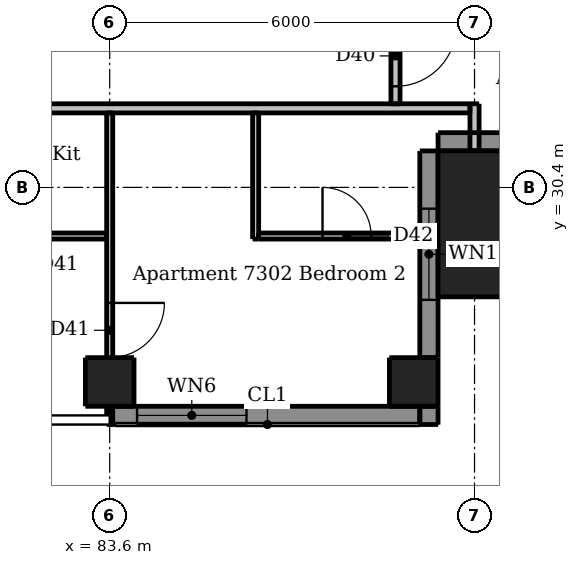
"""IFC4 building model, lengths in metres.
Left out: names, types, materials, properties, quantities, classifications, styles, units other than length and angle.
Written with IfcOpenShell. Run it as: python <this file> out.ifc"""

import sys

from ifc_helpers import new_model, si_unit, direction, frame, frame_2d, origin, origin_2d, place, context, subcontext, project, spatial, rectangle, extrude, element, fill, save


model = new_model("IFC4")
c1 = context("Model", 3, precision=1e-05, world=origin(), true_north=direction((0.0, 1.0)))
c2 = subcontext(c1, "Body", "Model", "MODEL_VIEW")
j1 = project(units=[si_unit("LENGTHUNIT", "METRE"), si_unit("PLANEANGLEUNIT", "RADIAN")], contexts=[c1])
p1 = place(None, origin())
s1 = spatial("IfcSite", under=j1, at=p1, CompositionType="ELEMENT")
p2 = place(p1, origin())
s2 = spatial("IfcBuilding", under=s1, at=p2, CompositionType="ELEMENT")
p3 = place(p2, frame((0.0, 0.0, 271.9)))
s3 = spatial("IfcBuildingStorey", under=s2, at=p3, CompositionType="ELEMENT", Elevation=271.9)
for number, where, z_axis, x_axis in (
    (1, (83.6, 27.2, 0.0), (0.0, 0.0, 1.0), (1.0, 0.0, 0.0)),
    (2, (88.6, 27.2, 0.0), (0.0, 0.0, 1.0), (1.0, 0.0, 0.0)),
):
    element("IfcColumn", number, at=place(p3, frame(where, z_axis=z_axis, x_axis=x_axis)), inside=s3, PredefinedType="COLUMN", context=c2, shape_type="SweptSolid", body=[
        extrude(rectangle(XDim=0.8, YDim=0.8, at=origin_2d()), origin(), (0.0, 0.0, 1.0), 3.05),
    ])
p4 = place(p3, frame((90.2, 29.8, 0.0), z_axis=(0.0, 0.0, 1.0), x_axis=(1.0, 0.0, 0.0)))
e3 = element("IfcColumn", 3, at=p4, inside=s3, PredefinedType="COLUMN", context=c2, shape_type="SweptSolid", body=[
    extrude(rectangle(XDim=2.4, YDim=2.4, at=origin_2d()), origin(), (0.0, 0.0, 1.0), 3.3),
])
p5 = place(p3, frame((88.85, 26.5, 0.0), z_axis=(0.0, 0.0, 1.0), x_axis=(0.0, 1.0, 0.0)))
e4 = element("IfcWall", 4, at=p5, inside=s3, PredefinedType="SOLIDWALL", context=c2, shape_type="SweptSolid", body=[
    extrude(rectangle(XDim=0.3, YDim=0.3, at=frame_2d((0.15, 0.0))), origin(), (0.0, 0.0, 1.0), 3.05),
])
p6 = place(p3, frame((88.85, 27.6, 0.0), z_axis=(0.0, 0.0, 1.0), x_axis=(0.0, 1.0, 0.0)))
e5 = element("IfcWall", 5, at=p6, inside=s3, PredefinedType="SOLIDWALL", context=c2, shape_type="SweptSolid", body=[
    extrude(rectangle(XDim=3.4, YDim=0.3, at=frame_2d((1.7, 0.0))), origin(), (0.0, 0.0, 1.0), 3.05),
])
p7 = place(p6, frame((0.95, 0.0, 0.9)))
e6 = element("IfcOpeningElement", 6, at=p7, cuts=e5, PredefinedType="OPENING", context=c2, shape_type="SweptSolid", body=[
    extrude(rectangle(XDim=1.5, YDim=1.5, at=frame_2d((0.75, 0.75))), frame((0.0, 0.16, 0.0), z_axis=(0.0, -1.0, 0.0), x_axis=(1.0, 0.0, 0.0)), (0.0, 0.0, 1.0), 0.32),
])
p8 = place(p3, frame((89.0, 31.15, 0.0), z_axis=(0.0, 0.0, 1.0), x_axis=(1.0, 0.0, 0.0)))
e7 = element("IfcWall", 7, at=p8, inside=s3, PredefinedType="SOLIDWALL", context=c2, shape_type="SweptSolid", body=[
    extrude(rectangle(XDim=3.4, YDim=0.3, at=frame_2d((1.7, 0.0))), origin(), (0.0, 0.0, 1.0), 3.05),
])
p9 = place(p3, frame((83.6, 26.65, 0.0), z_axis=(0.0, 0.0, 1.0), x_axis=(1.0, 0.0, 0.0)))
e8 = element("IfcWall", 8, at=p9, inside=s3, PredefinedType="SOLIDWALL", context=c2, shape_type="SweptSolid", body=[
    extrude(rectangle(XDim=5.1, YDim=0.3, at=frame_2d((2.55, 0.0))), origin(), (0.0, 0.0, 1.0), 3.05),
])
p10 = place(p9, frame((0.45, 0.0, 0.15)))
e9 = element("IfcOpeningElement", 9, at=p10, cuts=e8, PredefinedType="OPENING", context=c2, shape_type="SweptSolid", body=[
    extrude(rectangle(XDim=1.8, YDim=2.1, at=frame_2d((0.9, 1.05))), frame((0.0, 0.16, 0.0), z_axis=(0.0, -1.0, 0.0), x_axis=(1.0, 0.0, 0.0)), (0.0, 0.0, 1.0), 0.32),
])
p11 = place(p3, frame((83.6, 31.625, 0.0), z_axis=(0.0, 0.0, 1.0), x_axis=(0.0, -1.0, 0.0)))
e10 = element("IfcWall", 10, at=p11, inside=s3, PredefinedType="PARTITIONING", context=c2, shape_type="SweptSolid", body=[
    extrude(rectangle(XDim=5.125, YDim=0.1, at=frame_2d((2.562, 0.0))), origin(), (0.0, 0.0, 1.0), 2.647),
])
p12 = place(p11, frame((3.125, 0.0, 0.0)))
e11 = element("IfcOpeningElement", 11, at=p12, cuts=e10, PredefinedType="OPENING", context=c2, shape_type="SweptSolid", body=[
    extrude(rectangle(XDim=0.9, YDim=2.1, at=frame_2d((0.45, 1.05))), frame((0.0, 0.06, 0.0), z_axis=(0.0, -1.0, 0.0), x_axis=(1.0, 0.0, 0.0)), (0.0, 0.0, 1.0), 0.12),
])
p13 = place(p3, frame((86.0, 29.55, 0.0), z_axis=(0.0, 0.0, 1.0), x_axis=(0.0, 1.0, 0.0)))
e12 = element("IfcWall", 12, at=p13, inside=s3, PredefinedType="PARTITIONING", context=c2, shape_type="SweptSolid", body=[
    extrude(rectangle(XDim=2.075, YDim=0.1, at=frame_2d((1.038, 0.0))), origin(), (0.0, 0.0, 1.0), 3.05),
])
p14 = place(p3, frame((80.65, 29.6, 0.0), z_axis=(0.0, 0.0, 1.0), x_axis=(1.0, 0.0, 0.0)))
e13 = element("IfcWall", 13, at=p14, inside=s3, PredefinedType="PARTITIONING", context=c2, shape_type="SweptSolid", body=[
    extrude(rectangle(XDim=2.9, YDim=0.1, at=frame_2d((1.45, 0.0))), origin(), (0.0, 0.0, 1.0), 3.05),
])
p15 = place(p14, frame((1.0, 0.0, 0.0)))
e14 = element("IfcOpeningElement", 14, at=p15, cuts=e13, PredefinedType="OPENING", context=c2, shape_type="SweptSolid", body=[
    extrude(rectangle(XDim=0.9, YDim=2.1, at=frame_2d((0.45, 1.05))), frame((0.0, 0.06, 0.0), z_axis=(0.0, -1.0, 0.0), x_axis=(1.0, 0.0, 0.0)), (0.0, 0.0, 1.0), 0.12),
])
p16 = place(p3, frame((86.05, 29.6, 0.0), z_axis=(0.0, 0.0, 1.0), x_axis=(1.0, 0.0, 0.0)))
e15 = element("IfcWall", 15, at=p16, inside=s3, PredefinedType="PARTITIONING", context=c2, shape_type="SweptSolid", body=[
    extrude(rectangle(XDim=2.75, YDim=0.1, at=frame_2d((1.375, 0.0))), origin(), (0.0, 0.0, 1.0), 3.05),
])
p17 = place(p16, frame((1.05, 0.0, 0.0)))
e16 = element("IfcOpeningElement", 16, at=p17, cuts=e15, PredefinedType="OPENING", context=c2, shape_type="SweptSolid", body=[
    extrude(rectangle(XDim=0.8, YDim=2.1, at=frame_2d((0.4, 1.05))), frame((0.0, 0.06, 0.0), z_axis=(0.0, -1.0, 0.0), x_axis=(1.0, 0.0, 0.0)), (0.0, 0.0, 1.0), 0.12),
])
p18 = place(p3, frame((88.3, 61.175, 0.0), z_axis=(0.0, 0.0, 1.0), x_axis=(0.0, -1.0, 0.0)))
e17 = element("IfcWall", 17, at=p18, inside=s3, PredefinedType="PARTITIONING", context=c2, shape_type="SweptSolid", body=[
    extrude(rectangle(XDim=29.4, YDim=0.15, at=frame_2d((14.7, 0.0))), origin(), (0.0, 0.0, 1.0), 3.05),
])
p19 = place(p18, frame((28.113, 0.0, 0.0)))
e18 = element("IfcOpeningElement", 18, at=p19, cuts=e17, PredefinedType="OPENING", context=c2, shape_type="SweptSolid", body=[
    extrude(rectangle(XDim=1.0, YDim=2.1, at=frame_2d((0.5, 1.05))), frame((0.0, 0.085, 0.0), z_axis=(0.0, -1.0, 0.0), x_axis=(1.0, 0.0, 0.0)), (0.0, 0.0, 1.0), 0.17),
])
p20 = place(p18, frame((10.775, 0.0, 0.0)))
e19 = element("IfcOpeningElement", 19, at=p20, cuts=e17, PredefinedType="OPENING", context=c2, shape_type="SweptSolid", body=[
    extrude(rectangle(XDim=1.0, YDim=2.1, at=frame_2d((0.5, 1.05))), frame((0.0, 0.085, 0.0), z_axis=(0.0, -1.0, 0.0), x_axis=(1.0, 0.0, 0.0)), (0.0, 0.0, 1.0), 0.17),
])
p21 = place(p3, frame((89.6, 31.0, 0.0), z_axis=(0.0, 0.0, 1.0), x_axis=(0.0, 1.0, 0.0)))
e20 = element("IfcWall", 20, at=p21, inside=s3, PredefinedType="PARTITIONING", context=c2, shape_type="SweptSolid", body=[
    extrude(rectangle(XDim=0.775, YDim=0.15, at=frame_2d((0.387, 0.0))), origin(), (0.0, 0.0, 1.0), 3.05),
])
p22 = place(p3, frame((89.525, 31.7, 0.0), z_axis=(0.0, 0.0, 1.0), x_axis=(-1.0, 0.0, 0.0)))
e21 = element("IfcWall", 21, at=p22, inside=s3, PredefinedType="PARTITIONING", context=c2, shape_type="SweptSolid", body=[
    extrude(rectangle(XDim=30.55, YDim=0.15, at=frame_2d((15.275, 0.0))), origin(), (0.0, 0.0, 1.0), 3.05),
])
p23 = place(p22, frame((28.275, 0.0, 0.0)))
e22 = element("IfcOpeningElement", 22, at=p23, cuts=e21, PredefinedType="OPENING", context=c2, shape_type="SweptSolid", body=[
    extrude(rectangle(XDim=1.0, YDim=2.1, at=frame_2d((0.5, 1.05))), frame((0.0, 0.085, 0.0), z_axis=(0.0, -1.0, 0.0), x_axis=(1.0, 0.0, 0.0)), (0.0, 0.0, 1.0), 0.17),
])
p24 = place(p22, frame((11.425, 0.0, 0.0)))
e23 = element("IfcOpeningElement", 23, at=p24, cuts=e21, PredefinedType="OPENING", context=c2, shape_type="SweptSolid", body=[
    extrude(rectangle(XDim=1.0, YDim=2.1, at=frame_2d((0.5, 1.05))), frame((0.0, 0.085, 0.0), z_axis=(0.0, -1.0, 0.0), x_axis=(1.0, 0.0, 0.0)), (0.0, 0.0, 1.0), 0.17),
])
p25 = place(p7, origin())
e24 = element("IfcWindow", 24, at=p25, inside=s3, PartitioningType="DOUBLE_PANEL_VERTICAL", PredefinedType="WINDOW", context=c2, shape_type="SweptSolid", body=[
    extrude(rectangle(XDim=1.5, YDim=1.5, at=frame_2d((0.75, 0.75))), frame((0.0, 0.03, 0.0), z_axis=(0.0, -1.0, 0.0), x_axis=(1.0, 0.0, 0.0)), (0.0, 0.0, 1.0), 0.06),
])
fill(e6, e24)
p26 = place(p10, origin())
e25 = element("IfcWindow", 25, at=p26, inside=s3, PartitioningType="DOUBLE_PANEL_VERTICAL", PredefinedType="WINDOW", context=c2, shape_type="SweptSolid", body=[
    extrude(rectangle(XDim=1.8, YDim=2.1, at=frame_2d((0.9, 1.05))), frame((0.0, 0.03, 0.0), z_axis=(0.0, -1.0, 0.0), x_axis=(1.0, 0.0, 0.0)), (0.0, 0.0, 1.0), 0.06),
])
fill(e9, e25)
p27 = place(p12, origin())
e26 = element("IfcDoor", 26, at=p27, inside=s3, OperationType="SINGLE_SWING_LEFT", PredefinedType="DOOR", context=c2, shape_type="SweptSolid", body=[
    extrude(rectangle(XDim=0.9, YDim=2.1, at=frame_2d((0.45, 1.05))), frame((0.0, 0.025, 0.0), z_axis=(0.0, -1.0, 0.0), x_axis=(1.0, 0.0, 0.0)), (0.0, 0.0, 1.0), 0.05),
])
fill(e11, e26)
p28 = place(p17, origin())
e27 = element("IfcDoor", 27, at=p28, inside=s3, OperationType="SINGLE_SWING_LEFT", PredefinedType="DOOR", context=c2, shape_type="SweptSolid", body=[
    extrude(rectangle(XDim=0.8, YDim=2.1, at=frame_2d((0.4, 1.05))), frame((0.0, 0.025, 0.0), z_axis=(0.0, -1.0, 0.0), x_axis=(1.0, 0.0, 0.0)), (0.0, 0.0, 1.0), 0.05),
])
fill(e16, e27)
p29 = place(p19, origin())
e28 = element("IfcDoor", 28, at=p29, inside=s3, OperationType="SINGLE_SWING_LEFT", PredefinedType="DOOR", context=c2, shape_type="SweptSolid", body=[
    extrude(rectangle(XDim=1.0, YDim=2.1, at=frame_2d((0.5, 1.05))), frame((0.0, 0.025, 0.0), z_axis=(0.0, -1.0, 0.0), x_axis=(1.0, 0.0, 0.0)), (0.0, 0.0, 1.0), 0.05),
])
fill(e18, e28)
save(model, sys.argv[1])
